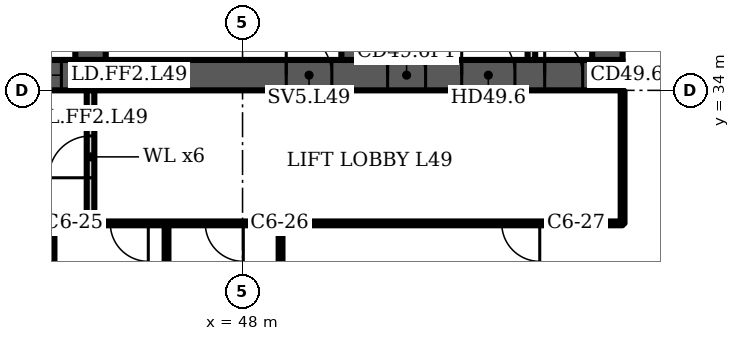
"""IFC4 building model, lengths in metres.
Left out: names, types, materials, properties, quantities, classifications, styles, units other than length and angle.
Written with IfcOpenShell. Run it as: python <this file> out.ifc"""

import sys

from ifc_helpers import new_model, si_unit, direction, frame, frame_2d, origin, place, context, subcontext, project, spatial, polyline, rectangle, outline, extrude, element, fill, save


model = new_model("IFC4")
c1 = context("Model", 3, precision=1e-05, world=origin(), true_north=direction((0.0, 1.0)))
c2 = subcontext(c1, "Body", "Model", "MODEL_VIEW")
j1 = project(units=[si_unit("LENGTHUNIT", "METRE"), si_unit("PLANEANGLEUNIT", "RADIAN")], contexts=[c1])
p1 = place(None, origin())
s1 = spatial("IfcSite", under=j1, at=p1, CompositionType="ELEMENT")
p2 = place(p1, origin())
s2 = spatial("IfcBuilding", under=s1, at=p2, CompositionType="ELEMENT")
p3 = place(p2, frame((0.0, 0.0, 198.7)))
s3 = spatial("IfcBuildingStorey", under=s2, at=p3, CompositionType="ELEMENT", Elevation=198.7)
p4 = place(p3, frame((16.0, 34.4, 0.0), z_axis=(0.0, 0.0, 1.0), x_axis=(1.0, 0.0, 0.0)))
e1 = element("IfcWall", 1, at=p4, inside=s3, PredefinedType="SHEAR", context=c2, shape_type="SweptSolid", body=[
    extrude(rectangle(XDim=42.0, YDim=0.8, at=frame_2d((21.0, 0.0))), origin(), (0.0, 0.0, 1.0), 3.6),
])
p5 = place(p4, frame((1.75, 0.0, 0.0)))
e2 = element("IfcOpeningElement", 2, at=p5, cuts=e1, PredefinedType="OPENING", context=c2, shape_type="SweptSolid", body=[
    extrude(rectangle(XDim=1.0, YDim=2.1, at=frame_2d((0.5, 1.05))), frame((0.0, 0.41, 0.0), z_axis=(0.0, -1.0, 0.0), x_axis=(1.0, 0.0, 0.0)), (0.0, 0.0, 1.0), 0.82),
])
p6 = place(p4, frame((4.65, 0.0, 0.0)))
e3 = element("IfcOpeningElement", 3, at=p6, cuts=e1, PredefinedType="OPENING", context=c2, shape_type="SweptSolid", body=[
    extrude(rectangle(XDim=1.0, YDim=2.1, at=frame_2d((0.5, 1.05))), frame((0.0, 0.41, 0.0), z_axis=(0.0, -1.0, 0.0), x_axis=(1.0, 0.0, 0.0)), (0.0, 0.0, 1.0), 0.82),
])
p7 = place(p4, frame((7.65, 0.0, 0.0)))
e4 = element("IfcOpeningElement", 4, at=p7, cuts=e1, PredefinedType="OPENING", context=c2, shape_type="SweptSolid", body=[
    extrude(rectangle(XDim=1.2, YDim=2.1, at=frame_2d((0.6, 1.05))), frame((0.0, 0.41, 0.0), z_axis=(0.0, -1.0, 0.0), x_axis=(1.0, 0.0, 0.0)), (0.0, 0.0, 1.0), 0.82),
])
p8 = place(p4, frame((14.767, 0.0, 0.0)))
e5 = element("IfcOpeningElement", 5, at=p8, cuts=e1, PredefinedType="OPENING", context=c2, shape_type="SweptSolid", body=[
    extrude(rectangle(XDim=1.1, YDim=2.1, at=frame_2d((0.55, 1.05))), frame((0.0, 0.41, 0.0), z_axis=(0.0, -1.0, 0.0), x_axis=(1.0, 0.0, 0.0)), (0.0, 0.0, 1.0), 0.82),
])
p9 = place(p4, frame((19.133, 0.0, 0.0)))
e6 = element("IfcOpeningElement", 6, at=p9, cuts=e1, PredefinedType="OPENING", context=c2, shape_type="SweptSolid", body=[
    extrude(rectangle(XDim=1.1, YDim=2.1, at=frame_2d((0.55, 1.05))), frame((0.0, 0.41, 0.0), z_axis=(0.0, -1.0, 0.0), x_axis=(1.0, 0.0, 0.0)), (0.0, 0.0, 1.0), 0.82),
])
p10 = place(p4, frame((16.8, 0.0, 0.0)))
e7 = element("IfcOpeningElement", 7, at=p10, cuts=e1, PredefinedType="OPENING", context=c2, shape_type="SweptSolid", body=[
    extrude(rectangle(XDim=1.4, YDim=2.1, at=frame_2d((0.7, 1.05))), frame((0.0, 0.41, 0.0), z_axis=(0.0, -1.0, 0.0), x_axis=(1.0, 0.0, 0.0)), (0.0, 0.0, 1.0), 0.82),
])
p11 = place(p4, frame((21.767, 0.0, 0.0)))
e8 = element("IfcOpeningElement", 8, at=p11, cuts=e1, PredefinedType="OPENING", context=c2, shape_type="SweptSolid", body=[
    extrude(rectangle(XDim=1.1, YDim=2.1, at=frame_2d((0.55, 1.05))), frame((0.0, 0.41, 0.0), z_axis=(0.0, -1.0, 0.0), x_axis=(1.0, 0.0, 0.0)), (0.0, 0.0, 1.0), 0.82),
])
p12 = place(p4, frame((23.95, 0.0, 0.0)))
e9 = element("IfcOpeningElement", 9, at=p12, cuts=e1, PredefinedType="OPENING", context=c2, shape_type="SweptSolid", body=[
    extrude(rectangle(XDim=1.1, YDim=2.1, at=frame_2d((0.55, 1.05))), frame((0.0, 0.41, 0.0), z_axis=(0.0, -1.0, 0.0), x_axis=(1.0, 0.0, 0.0)), (0.0, 0.0, 1.0), 0.82),
])
p13 = place(p4, frame((26.133, 0.0, 0.0)))
e10 = element("IfcOpeningElement", 10, at=p13, cuts=e1, PredefinedType="OPENING", context=c2, shape_type="SweptSolid", body=[
    extrude(rectangle(XDim=1.1, YDim=2.1, at=frame_2d((0.55, 1.05))), frame((0.0, 0.41, 0.0), z_axis=(0.0, -1.0, 0.0), x_axis=(1.0, 0.0, 0.0)), (0.0, 0.0, 1.0), 0.82),
])
p14 = place(p4, frame((33.15, 0.0, 0.0)))
e11 = element("IfcOpeningElement", 11, at=p14, cuts=e1, PredefinedType="OPENING", context=c2, shape_type="SweptSolid", body=[
    extrude(rectangle(XDim=1.2, YDim=2.1, at=frame_2d((0.6, 1.05))), frame((0.0, 0.41, 0.0), z_axis=(0.0, -1.0, 0.0), x_axis=(1.0, 0.0, 0.0)), (0.0, 0.0, 1.0), 0.82),
])
p15 = place(p4, frame((35.817, 0.0, 0.0)))
e12 = element("IfcOpeningElement", 12, at=p15, cuts=e1, PredefinedType="OPENING", context=c2, shape_type="SweptSolid", body=[
    extrude(rectangle(XDim=1.0, YDim=2.1, at=frame_2d((0.5, 1.05))), frame((0.0, 0.41, 0.0), z_axis=(0.0, -1.0, 0.0), x_axis=(1.0, 0.0, 0.0)), (0.0, 0.0, 1.0), 0.82),
])
p16 = place(p4, frame((39.95, 0.0, 0.0)))
e13 = element("IfcOpeningElement", 13, at=p16, cuts=e1, PredefinedType="OPENING", context=c2, shape_type="SweptSolid", body=[
    extrude(rectangle(XDim=1.0, YDim=2.1, at=frame_2d((0.5, 1.05))), frame((0.0, 0.41, 0.0), z_axis=(0.0, -1.0, 0.0), x_axis=(1.0, 0.0, 0.0)), (0.0, 0.0, 1.0), 0.82),
])
p17 = place(p4, frame((37.767, 0.0, 0.0)))
e14 = element("IfcOpeningElement", 14, at=p17, cuts=e1, PredefinedType="OPENING", context=c2, shape_type="SweptSolid", body=[
    extrude(rectangle(XDim=1.4, YDim=2.1, at=frame_2d((0.7, 1.05))), frame((0.0, 0.41, 0.0), z_axis=(0.0, -1.0, 0.0), x_axis=(1.0, 0.0, 0.0)), (0.0, 0.0, 1.0), 0.82),
])
p18 = place(p3, frame((44.0, 34.8, 0.0), z_axis=(0.0, 0.0, 1.0), x_axis=(0.0, 1.0, 0.0)))
e15 = element("IfcWall", 15, at=p18, inside=s3, PredefinedType="SHEAR", context=c2, shape_type="SweptSolid", body=[
    extrude(rectangle(XDim=14.374, YDim=0.8, at=frame_2d((7.187, 0.0))), origin(), (0.0, 0.0, 1.0), 3.6),
])
p19 = place(p18, frame((11.312, 0.0, 0.0)))
e16 = element("IfcOpeningElement", 16, at=p19, cuts=e15, PredefinedType="OPENING", context=c2, shape_type="SweptSolid", body=[
    extrude(rectangle(XDim=1.0, YDim=2.1, at=frame_2d((0.5, 1.05))), frame((0.0, 0.41, 0.0), z_axis=(0.0, -1.0, 0.0), x_axis=(1.0, 0.0, 0.0)), (0.0, 0.0, 1.0), 0.82),
])
p20 = place(p18, frame((3.6, 0.0, 0.0)))
e17 = element("IfcOpeningElement", 17, at=p20, cuts=e15, PredefinedType="OPENING", context=c2, shape_type="SweptSolid", body=[
    extrude(rectangle(XDim=1.1, YDim=2.1, at=frame_2d((0.55, 1.05))), frame((0.0, 0.41, 0.0), z_axis=(0.0, -1.0, 0.0), x_axis=(1.0, 0.0, 0.0)), (0.0, 0.0, 1.0), 0.82),
])
p21 = place(p3, frame((51.0, 34.8, 0.0), z_axis=(0.0, 0.0, 1.0), x_axis=(0.0, 1.0, 0.0)))
e18 = element("IfcWall", 18, at=p21, inside=s3, PredefinedType="SHEAR", context=c2, shape_type="SweptSolid", body=[
    extrude(rectangle(XDim=13.762, YDim=0.8, at=frame_2d((6.881, 0.0))), origin(), (0.0, 0.0, 1.0), 3.6),
])
p22 = place(p21, frame((3.6, 0.0, 0.0)))
e19 = element("IfcOpeningElement", 19, at=p22, cuts=e18, PredefinedType="OPENING", context=c2, shape_type="SweptSolid", body=[
    extrude(rectangle(XDim=1.1, YDim=2.1, at=frame_2d((0.55, 1.05))), frame((0.0, 0.41, 0.0), z_axis=(0.0, -1.0, 0.0), x_axis=(1.0, 0.0, 0.0)), (0.0, 0.0, 1.0), 0.82),
])
p23 = place(p3, frame((57.6, 34.8, 0.0), z_axis=(0.0, 0.0, 1.0), x_axis=(0.0, 1.0, 0.0)))
e20 = element("IfcWall", 20, at=p23, inside=s3, PredefinedType="SHEAR", context=c2, shape_type="SweptSolid", body=[
    extrude(rectangle(XDim=13.184, YDim=0.8, at=frame_2d((6.592, 0.0))), origin(), (0.0, 0.0, 1.0), 3.6),
])
p24 = place(p3, origin())
e21 = element("IfcWall", 21, at=p24, inside=s3, PredefinedType="PARTITIONING", context=c2, shape_type="SweptSolid", body=[
    extrude(outline(polyline([(41.567, 37.1), (39.433, 37.1), (39.433, 34.8), (39.233, 34.8), (39.233, 37.65), (37.4, 37.65), (37.4, 37.85), (39.233, 37.85), (39.433, 37.85), (39.433, 37.3), (41.567, 37.3), (41.567, 37.55), (41.767, 37.55), (43.6, 37.55), (43.6, 37.35), (41.767, 37.35), (41.767, 34.8), (41.567, 34.8), (41.567, 37.1)])), origin(), (0.0, 0.0, 1.0), 3.15),
])
p25 = place(p3, origin())
e22 = element("IfcWall", 22, at=p25, inside=s3, PredefinedType="PARTITIONING", context=c2, shape_type="SweptSolid", body=[
    extrude(outline(polyline([(53.233, 34.8), (53.233, 37.3), (53.433, 37.3), (53.433, 34.8), (53.233, 34.8)])), origin(), (0.0, 0.0, 1.0), 3.15),
])
p26 = place(p3, origin())
e23 = element("IfcWall", 23, at=p26, inside=s3, PredefinedType="PARTITIONING", context=c2, shape_type="SweptSolid", body=[
    extrude(outline(polyline([(55.5, 34.8), (55.5, 37.3), (55.7, 37.3), (55.7, 34.8), (55.5, 34.8)])), origin(), (0.0, 0.0, 1.0), 3.15),
])
p27 = place(p3, frame((44.0, 30.5, 0.0), z_axis=(0.0, 0.0, 1.0), x_axis=(0.0, 1.0, 0.0)))
e24 = element("IfcWall", 24, at=p27, inside=s3, PredefinedType="PARTITIONING", context=c2, shape_type="SweptSolid", body=[
    extrude(rectangle(XDim=3.5, YDim=0.2, at=frame_2d((1.75, 0.0))), origin(), (0.0, 0.0, 1.0), 3.15),
])
p28 = place(p27, frame((1.2, 0.0, 0.0)))
e25 = element("IfcOpeningElement", 25, at=p28, cuts=e24, PredefinedType="OPENING", context=c2, shape_type="SweptSolid", body=[
    extrude(rectangle(XDim=1.1, YDim=2.1, at=frame_2d((0.55, 1.05))), frame((0.0, 0.11, 0.0), z_axis=(0.0, -1.0, 0.0), x_axis=(1.0, 0.0, 0.0)), (0.0, 0.0, 1.0), 0.22),
])
p29 = place(p3, frame((41.1, 30.6, 0.0), z_axis=(0.0, 0.0, 1.0), x_axis=(1.0, 0.0, 0.0)))
e26 = element("IfcWall", 26, at=p29, inside=s3, PredefinedType="PARTITIONING", context=c2, shape_type="SweptSolid", body=[
    extrude(rectangle(XDim=2.8, YDim=0.2, at=frame_2d((1.4, 0.0))), origin(), (0.0, 0.0, 1.0), 3.15),
])
p30 = place(p3, frame((43.0, 22.34, 0.0), z_axis=(0.0, 0.0, 1.0), x_axis=(0.0, 1.0, 0.0)))
e27 = element("IfcWall", 27, at=p30, inside=s3, PredefinedType="PARTITIONING", context=c2, shape_type="SweptSolid", body=[
    extrude(rectangle(XDim=8.15, YDim=0.1, at=frame_2d((4.075, 0.0))), origin(), (0.0, 0.0, 1.0), 3.15),
])
for number, where, z_axis, x_axis in (
    (28, (46.0, 22.34, 0.0), (0.0, 0.0, 1.0), (0.0, 1.0, 0.0)),
    (29, (49.0, 22.34, 0.0), (0.0, 0.0, 1.0), (0.0, 1.0, 0.0)),
):
    element("IfcWall", number, at=place(p3, frame(where, z_axis=z_axis, x_axis=x_axis)), inside=s3, PredefinedType="PARTITIONING", context=c2, shape_type="SweptSolid", body=[
        extrude(rectangle(XDim=8.16, YDim=0.1, at=frame_2d((4.08, 0.0))), origin(), (0.0, 0.0, 1.0), 3.15),
    ])
p31 = place(p3, frame((58.0, 30.5, 0.0), z_axis=(0.0, 0.0, 1.0), x_axis=(0.0, 1.0, 0.0)))
e30 = element("IfcWall", 30, at=p31, inside=s3, PredefinedType="PARTITIONING", context=c2, shape_type="SweptSolid", body=[
    extrude(rectangle(XDim=3.48, YDim=0.1, at=frame_2d((1.74, 0.0))), origin(), (0.0, 0.0, 1.0), 3.15),
])
p32 = place(p3, frame((44.15, 30.5, 0.0), z_axis=(0.0, 0.0, 1.0), x_axis=(1.0, 0.0, 0.0)))
e31 = element("IfcWall", 31, at=p32, inside=s3, PredefinedType="PARTITIONING", context=c2, shape_type="SweptSolid", body=[
    extrude(rectangle(XDim=13.85, YDim=0.1, at=frame_2d((6.925, 0.0))), origin(), (0.0, 0.0, 1.0), 3.15),
])
p33 = place(p32, frame((0.37, 0.0, 0.0)))
e32 = element("IfcOpeningElement", 32, at=p33, cuts=e31, PredefinedType="OPENING", context=c2, shape_type="SweptSolid", body=[
    extrude(rectangle(XDim=1.0, YDim=2.1, at=frame_2d((0.5, 1.05))), frame((0.0, 0.06, 0.0), z_axis=(0.0, -1.0, 0.0), x_axis=(1.0, 0.0, 0.0)), (0.0, 0.0, 1.0), 0.12),
])
p34 = place(p32, frame((2.87, 0.0, 0.0)))
e33 = element("IfcOpeningElement", 33, at=p34, cuts=e31, PredefinedType="OPENING", context=c2, shape_type="SweptSolid", body=[
    extrude(rectangle(XDim=1.0, YDim=2.1, at=frame_2d((0.5, 1.05))), frame((0.0, 0.06, 0.0), z_axis=(0.0, -1.0, 0.0), x_axis=(1.0, 0.0, 0.0)), (0.0, 0.0, 1.0), 0.12),
])
p35 = place(p32, frame((10.67, 0.0, 0.0)))
e34 = element("IfcOpeningElement", 34, at=p35, cuts=e31, PredefinedType="OPENING", context=c2, shape_type="SweptSolid", body=[
    extrude(rectangle(XDim=1.0, YDim=2.1, at=frame_2d((0.5, 1.05))), frame((0.0, 0.06, 0.0), z_axis=(0.0, -1.0, 0.0), x_axis=(1.0, 0.0, 0.0)), (0.0, 0.0, 1.0), 0.12),
])
p36 = place(p13, origin())
e35 = element("IfcDoor", 35, at=p36, inside=s3, OperationType="DOUBLE_DOOR_SLIDING", PredefinedType="DOOR", context=c2, shape_type="SweptSolid", body=[
    extrude(rectangle(XDim=1.1, YDim=2.1, at=frame_2d((0.55, 1.05))), frame((0.0, 0.025, 0.0), z_axis=(0.0, -1.0, 0.0), x_axis=(1.0, 0.0, 0.0)), (0.0, 0.0, 1.0), 0.05),
])
fill(e10, e35)
p37 = place(p14, origin())
e36 = element("IfcDoor", 36, at=p37, inside=s3, OperationType="SINGLE_SWING_LEFT", PredefinedType="DOOR", context=c2, shape_type="SweptSolid", body=[
    extrude(rectangle(XDim=1.2, YDim=2.1, at=frame_2d((0.6, 1.05))), frame((0.0, 0.025, 0.0), z_axis=(0.0, -1.0, 0.0), x_axis=(1.0, 0.0, 0.0)), (0.0, 0.0, 1.0), 0.05),
])
fill(e11, e36)
p38 = place(p15, origin())
e37 = element("IfcDoor", 37, at=p38, inside=s3, OperationType="SINGLE_SWING_LEFT", PredefinedType="DOOR", context=c2, shape_type="SweptSolid", body=[
    extrude(rectangle(XDim=1.0, YDim=2.1, at=frame_2d((0.5, 1.05))), frame((0.0, 0.4, 0.0), z_axis=(0.0, -1.0, 0.0), x_axis=(1.0, 0.0, 0.0)), (0.0, 0.0, 1.0), 0.8),
])
fill(e12, e37)
p39 = place(p16, origin())
e38 = element("IfcDoor", 38, at=p39, inside=s3, OperationType="SINGLE_SWING_LEFT", PredefinedType="DOOR", context=c2, shape_type="SweptSolid", body=[
    extrude(rectangle(XDim=1.0, YDim=2.1, at=frame_2d((0.5, 1.05))), frame((0.0, 0.4, 0.0), z_axis=(0.0, -1.0, 0.0), x_axis=(1.0, 0.0, 0.0)), (0.0, 0.0, 1.0), 0.8),
])
fill(e13, e38)
p40 = place(p17, origin())
e39 = element("IfcDoor", 39, at=p40, inside=s3, OperationType="DOUBLE_DOOR_SINGLE_SWING", PredefinedType="DOOR", context=c2, shape_type="SweptSolid", body=[
    extrude(rectangle(XDim=1.4, YDim=2.1, at=frame_2d((0.7, 1.05))), frame((0.0, 0.025, 0.0), z_axis=(0.0, -1.0, 0.0), x_axis=(1.0, 0.0, 0.0)), (0.0, 0.0, 1.0), 0.05),
])
fill(e14, e39)
p41 = place(p28, origin())
e40 = element("IfcDoor", 40, at=p41, inside=s3, OperationType="SINGLE_SWING_LEFT", PredefinedType="DOOR", context=c2, shape_type="SweptSolid", body=[
    extrude(rectangle(XDim=1.1, YDim=2.1, at=frame_2d((0.55, 1.05))), frame((0.0, 0.025, 0.0), z_axis=(0.0, -1.0, 0.0), x_axis=(1.0, 0.0, 0.0)), (0.0, 0.0, 1.0), 0.05),
])
fill(e25, e40)
p42 = place(p33, origin())
e41 = element("IfcDoor", 41, at=p42, inside=s3, OperationType="SINGLE_SWING_RIGHT", PredefinedType="DOOR", context=c2, shape_type="SweptSolid", body=[
    extrude(rectangle(XDim=1.0, YDim=2.1, at=frame_2d((0.5, 1.05))), frame((0.0, 0.025, 0.0), z_axis=(0.0, -1.0, 0.0), x_axis=(1.0, 0.0, 0.0)), (0.0, 0.0, 1.0), 0.05),
])
fill(e32, e41)
p43 = place(p34, origin())
e42 = element("IfcDoor", 42, at=p43, inside=s3, OperationType="SINGLE_SWING_RIGHT", PredefinedType="DOOR", context=c2, shape_type="SweptSolid", body=[
    extrude(rectangle(XDim=1.0, YDim=2.1, at=frame_2d((0.5, 1.05))), frame((0.0, 0.025, 0.0), z_axis=(0.0, -1.0, 0.0), x_axis=(1.0, 0.0, 0.0)), (0.0, 0.0, 1.0), 0.05),
])
fill(e33, e42)
p44 = place(p35, origin())
e43 = element("IfcDoor", 43, at=p44, inside=s3, OperationType="SINGLE_SWING_RIGHT", PredefinedType="DOOR", context=c2, shape_type="SweptSolid", body=[
    extrude(rectangle(XDim=1.0, YDim=2.1, at=frame_2d((0.5, 1.05))), frame((0.0, 0.025, 0.0), z_axis=(0.0, -1.0, 0.0), x_axis=(1.0, 0.0, 0.0)), (0.0, 0.0, 1.0), 0.05),
])
fill(e34, e43)
save(model, sys.argv[1])
